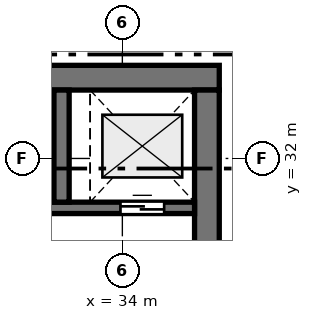
"""IFC4 building model, lengths in metres.
Left out: names, types, materials, properties, quantities, classifications, styles, units other than length and angle.
Written with IfcOpenShell. Run it as: python <this file> out.ifc"""

import sys

from ifc_helpers import new_model, si_unit, direction, frame, frame_2d, origin, place, context, subcontext, project, spatial, rectangle, extrude, source, transform, mapped, element, fill, save


model = new_model("IFC4")
c1 = context("Model", 3, precision=1e-05, world=origin(), true_north=direction((0.0, 1.0)))
c2 = subcontext(c1, "Body", "Model", "MODEL_VIEW")
j1 = project(units=[si_unit("LENGTHUNIT", "METRE"), si_unit("PLANEANGLEUNIT", "RADIAN")], contexts=[c1])
p1 = place(None, origin())
s1 = spatial("IfcSite", under=j1, at=p1, CompositionType="ELEMENT")
p2 = place(p1, origin())
s2 = spatial("IfcBuilding", under=s1, at=p2, CompositionType="ELEMENT")
p3 = place(p2, frame((0.0, 0.0, 86.4)))
s3 = spatial("IfcBuildingStorey", under=s2, at=p3, CompositionType="ELEMENT", Elevation=86.4)
p4 = place(p3, frame((36.55, 34.125, 0.0), z_axis=(0.0, 0.0, 1.0), x_axis=(-1.0, 0.0, 0.0)))
e1 = element("IfcWall", 1, at=p4, inside=s3, PredefinedType="SHEAR", context=c2, shape_type="SweptSolid", body=[
    extrude(rectangle(XDim=12.4, YDim=0.65, at=frame_2d((6.2, 0.0))), origin(), (0.0, 0.0, 1.0), 2.95),
])
p5 = place(p3, frame((36.225, 18.2, 0.0), z_axis=(0.0, 0.0, 1.0), x_axis=(0.0, 1.0, 0.0)))
e2 = element("IfcWall", 2, at=p5, inside=s3, PredefinedType="SHEAR", context=c2, shape_type="SweptSolid", body=[
    extrude(rectangle(XDim=15.6, YDim=0.65, at=frame_2d((7.8, 0.0))), origin(), (0.0, 0.0, 1.0), 2.95),
])
p6 = place(p5, frame((4.25, 0.0, 0.0)))
e3 = element("IfcOpeningElement", 3, at=p6, cuts=e2, PredefinedType="OPENING", context=c2, shape_type="SweptSolid", body=[
    extrude(rectangle(XDim=1.1, YDim=2.15, at=frame_2d((0.55, 1.075))), frame((0.0, 0.335, 0.0), z_axis=(0.0, -1.0, 0.0), x_axis=(1.0, 0.0, 0.0)), (0.0, 0.0, 1.0), 0.67),
])
p7 = place(p5, frame((10.25, 0.0, 0.0)))
e4 = element("IfcOpeningElement", 4, at=p7, cuts=e2, PredefinedType="OPENING", context=c2, shape_type="SweptSolid", body=[
    extrude(rectangle(XDim=1.1, YDim=2.15, at=frame_2d((0.55, 1.075))), frame((0.0, 0.335, 0.0), z_axis=(0.0, -1.0, 0.0), x_axis=(1.0, 0.0, 0.0)), (0.0, 0.0, 1.0), 0.67),
])
p8 = place(p3, frame((24.8, 30.7, 0.0), z_axis=(0.0, 0.0, 1.0), x_axis=(1.0, 0.0, 0.0)))
e5 = element("IfcWall", 5, at=p8, inside=s3, PredefinedType="SHEAR", context=c2, shape_type="SweptSolid", body=[
    extrude(rectangle(XDim=11.1, YDim=0.3, at=frame_2d((5.55, 0.0))), origin(), (0.0, 0.0, 1.0), 2.95),
])
p9 = place(p8, frame((6.22, 0.0, 0.0)))
e6 = element("IfcOpeningElement", 6, at=p9, cuts=e5, PredefinedType="OPENING", context=c2, shape_type="SweptSolid", body=[
    extrude(rectangle(XDim=0.98, YDim=2.15, at=frame_2d((0.49, 1.075))), frame((0.0, 0.16, 0.0), z_axis=(0.0, -1.0, 0.0), x_axis=(1.0, 0.0, 0.0)), (0.0, 0.0, 1.0), 0.32),
])
p10 = place(p8, frame((9.15, 0.0, 0.0)))
e7 = element("IfcOpeningElement", 7, at=p10, cuts=e5, PredefinedType="OPENING", context=c2, shape_type="SweptSolid", body=[
    extrude(rectangle(XDim=1.15, YDim=2.15, at=frame_2d((0.575, 1.075))), frame((0.0, 0.16, 0.0), z_axis=(0.0, -1.0, 0.0), x_axis=(1.0, 0.0, 0.0)), (0.0, 0.0, 1.0), 0.32),
])
p11 = place(p3, frame((32.4, 30.85, 0.0), z_axis=(0.0, 0.0, 1.0), x_axis=(0.0, 1.0, 0.0)))
e8 = element("IfcWall", 8, at=p11, inside=s3, PredefinedType="SHEAR", context=c2, shape_type="SweptSolid", body=[
    extrude(rectangle(XDim=2.95, YDim=0.4, at=frame_2d((1.475, 0.0))), origin(), (0.0, 0.0, 1.0), 2.95),
])
m1 = source(origin(), c2, "Body", "SweptSolid", [
    extrude(rectangle(XDim=1.15, YDim=2.15, at=frame_2d((0.575, 1.075))), frame((0.0, 0.025, 0.0), z_axis=(0.0, -1.0, 0.0), x_axis=(1.0, 0.0, 0.0)), (0.0, 0.0, 1.0), 0.05),
])
p12 = place(p10, origin())
e9 = element("IfcDoor", 9, at=p12, inside=s3, OperationType="DOUBLE_DOOR_SLIDING", PredefinedType="DOOR", context=c2, shape_type="MappedRepresentation", body=[
    mapped(m1, transform((0.0, 0.0, 0.0), x_axis=(1.0, 0.0, 0.0), y_axis=(0.0, 1.0, 0.0), z_axis=(0.0, 0.0, 1.0), scale=1.0)),
])
fill(e7, e9)
save(model, sys.argv[1])
